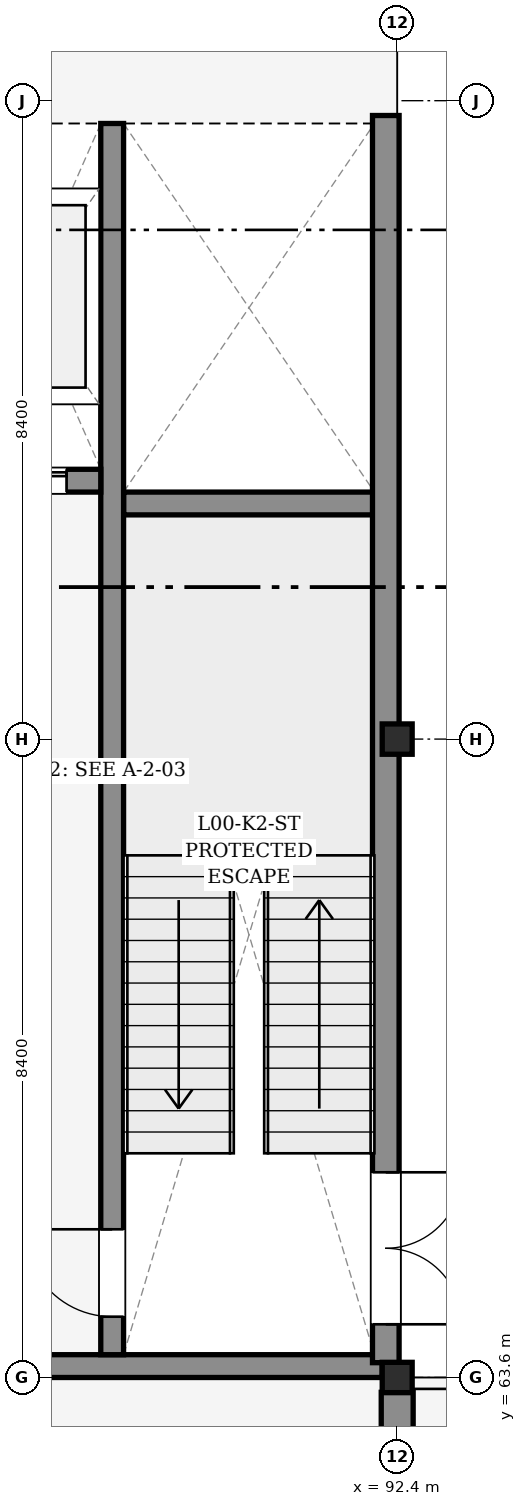
"""IFC4 building model, lengths in metres.
Left out: names, types, materials, properties, quantities, classifications, styles, units other than length and angle.
Written with IfcOpenShell. Run it as: python <this file> out.ifc"""

import sys

from ifc_helpers import new_model, si_unit, direction, frame, frame_2d, origin, origin_2d, place, context, subcontext, project, spatial, rectangle, i_section, extrude, element, fill, save


model = new_model("IFC4")
c1 = context("Model", 3, precision=1e-05, world=origin(), true_north=direction((0.0, 1.0)))
c2 = subcontext(c1, "Body", "Model", "MODEL_VIEW")
j1 = project(units=[si_unit("LENGTHUNIT", "METRE"), si_unit("PLANEANGLEUNIT", "RADIAN")], contexts=[c1])
p1 = place(None, origin())
s1 = spatial("IfcSite", under=j1, at=p1, CompositionType="ELEMENT")
p2 = place(p1, origin())
s2 = spatial("IfcBuilding", under=s1, at=p2, CompositionType="ELEMENT")
p3 = place(p2, origin())
s3 = spatial("IfcBuildingStorey", under=s2, at=p3, CompositionType="ELEMENT", Elevation=0.0)
for number, where, z_axis, x_axis in (
    (1, (92.4, 63.6, 0.0), (0.0, 0.0, 1.0), (1.0, 0.0, 0.0)),
    (2, (92.4, 72.0, 0.0), (0.0, 0.0, 1.0), (1.0, 0.0, 0.0)),
    (3, (92.4, 80.4, 0.0), (0.0, 0.0, 1.0), (1.0, 0.0, 0.0)),
):
    element("IfcColumn", number, at=place(p3, frame(where, z_axis=z_axis, x_axis=x_axis)), inside=s3, PredefinedType="COLUMN", context=c2, shape_type="SweptSolid", body=[
        extrude(i_section(OverallWidth=0.399, OverallDepth=0.394, WebThickness=0.023, FlangeThickness=0.037, FilletRadius=0.015, at=origin_2d()), origin(), (0.0, 0.0, 1.0), 5.4),
    ])
p4 = place(p3, frame((92.4, 55.395, 0.0), z_axis=(0.0, 0.0, 1.0), x_axis=(0.0, 1.0, 0.0)))
e4 = element("IfcWall", 4, at=p4, inside=s3, PredefinedType="STANDARD", context=c2, shape_type="SweptSolid", body=[
    extrude(rectangle(XDim=8.01, YDim=0.42, at=frame_2d((4.005, 0.0))), origin(), (0.0, 0.0, 1.0), 4.335),
])
p5 = place(p4, frame((2.9, 0.0, 0.0)))
e5 = element("IfcOpeningElement", 5, at=p5, cuts=e4, PredefinedType="OPENING", context=c2, shape_type="SweptSolid", body=[
    extrude(rectangle(XDim=2.2, YDim=2.6, at=frame_2d((1.1, 1.3))), frame((0.0, 0.22, 0.0), z_axis=(0.0, -1.0, 0.0), x_axis=(1.0, 0.0, 0.0)), (0.0, 0.0, 1.0), 0.44),
])
for number, where, z_axis, x_axis in (
    (6, (84.198, 63.75, 0.0), (0.0, 0.0, 1.0), (1.0, 0.0, 0.0)),
    (7, (84.198, 80.25, 0.0), (0.0, 0.0, 1.0), (1.0, 0.0, 0.0)),
):
    element("IfcWall", number, at=place(p3, frame(where, z_axis=z_axis, x_axis=x_axis)), inside=s3, PredefinedType="SHEAR", context=c2, shape_type="SweptSolid", body=[
        extrude(rectangle(XDim=8.005, YDim=0.3, at=frame_2d((4.002, 0.0))), origin(), (0.0, 0.0, 1.0), 5.18),
    ])
p6 = place(p3, frame((88.8, 75.1, 0.0), z_axis=(0.0, 0.0, 1.0), x_axis=(1.0, 0.0, 0.0)))
e8 = element("IfcWall", 8, at=p6, inside=s3, PredefinedType="SHEAR", context=c2, shape_type="SweptSolid", body=[
    extrude(rectangle(XDim=3.3, YDim=0.3, at=frame_2d((1.65, 0.0))), origin(), (0.0, 0.0, 1.0), 5.18),
])
p7 = place(p3, frame((92.25, 63.795, 0.0), z_axis=(0.0, 0.0, 1.0), x_axis=(0.0, 1.0, 0.0)))
e9 = element("IfcWall", 9, at=p7, inside=s3, PredefinedType="SHEAR", context=c2, shape_type="SweptSolid", body=[
    extrude(rectangle(XDim=16.41, YDim=0.35, at=frame_2d((8.205, 0.0))), origin(), (0.0, 0.0, 1.0), 5.18),
])
p8 = place(p7, frame((0.505, 0.0, 0.0)))
e10 = element("IfcOpeningElement", 10, at=p8, cuts=e9, PredefinedType="OPENING", context=c2, shape_type="SweptSolid", body=[
    extrude(rectangle(XDim=2.0, YDim=2.24, at=frame_2d((1.0, 1.12))), frame((0.0, 0.185, 0.0), z_axis=(0.0, -1.0, 0.0), x_axis=(1.0, 0.0, 0.0)), (0.0, 0.0, 1.0), 0.37),
])
p9 = place(p3, frame((88.65, 63.9, 0.0), z_axis=(0.0, 0.0, 1.0), x_axis=(0.0, 1.0, 0.0)))
e11 = element("IfcWall", 11, at=p9, inside=s3, PredefinedType="SHEAR", context=c2, shape_type="SweptSolid", body=[
    extrude(rectangle(XDim=16.2, YDim=0.3, at=frame_2d((8.1, 0.0))), origin(), (0.0, 0.0, 1.0), 5.18),
])
p10 = place(p9, frame((0.5, 0.0, 0.0)))
e12 = element("IfcOpeningElement", 12, at=p10, cuts=e11, PredefinedType="OPENING", context=c2, shape_type="SweptSolid", body=[
    extrude(rectangle(XDim=1.15, YDim=2.15, at=frame_2d((0.575, 1.075))), frame((0.0, 0.16, 0.0), z_axis=(0.0, -1.0, 0.0), x_axis=(1.0, 0.0, 0.0)), (0.0, 0.0, 1.0), 0.32),
])
p11 = place(p3, frame((84.3, 75.4, 0.0), z_axis=(0.0, 0.0, 1.0), x_axis=(1.0, 0.0, 0.0)))
e13 = element("IfcWall", 13, at=p11, inside=s3, PredefinedType="SHEAR", context=c2, shape_type="SweptSolid", body=[
    extrude(rectangle(XDim=4.2, YDim=0.3, at=frame_2d((2.1, 0.0))), origin(), (0.0, 0.0, 1.0), 5.18),
])
p12 = place(p11, frame((0.45, 0.0, 0.0)))
e14 = element("IfcOpeningElement", 14, at=p12, cuts=e13, PredefinedType="OPENING", context=c2, shape_type="SweptSolid", body=[
    extrude(rectangle(XDim=1.1, YDim=2.2, at=frame_2d((0.55, 1.1))), frame((0.0, 0.16, 0.0), z_axis=(0.0, -1.0, 0.0), x_axis=(1.0, 0.0, 0.0)), (0.0, 0.0, 1.0), 0.32),
])
p13 = place(p11, frame((2.65, 0.0, 0.0)))
e15 = element("IfcOpeningElement", 15, at=p13, cuts=e13, PredefinedType="OPENING", context=c2, shape_type="SweptSolid", body=[
    extrude(rectangle(XDim=1.1, YDim=2.2, at=frame_2d((0.55, 1.1))), frame((0.0, 0.16, 0.0), z_axis=(0.0, -1.0, 0.0), x_axis=(1.0, 0.0, 0.0)), (0.0, 0.0, 1.0), 0.32),
])
p14 = place(p8, frame((2.0, 0.0, 0.0), z_axis=(0.0, 0.0, 1.0), x_axis=(-1.0, 0.0, 0.0)))
e16 = element("IfcDoor", 16, at=p14, inside=s3, OperationType="DOUBLE_DOOR_SINGLE_SWING", PredefinedType="DOOR", context=c2, shape_type="SweptSolid", body=[
    extrude(rectangle(XDim=2.0, YDim=2.24, at=frame_2d((1.0, 1.12))), frame((0.0, 0.025, 0.0), z_axis=(0.0, -1.0, 0.0), x_axis=(1.0, 0.0, 0.0)), (0.0, 0.0, 1.0), 0.05),
])
fill(e10, e16)
p15 = place(p10, origin())
e17 = element("IfcDoor", 17, at=p15, inside=s3, OperationType="SINGLE_SWING_RIGHT", PredefinedType="DOOR", context=c2, shape_type="SweptSolid", body=[
    extrude(rectangle(XDim=1.15, YDim=2.15, at=frame_2d((0.575, 1.075))), frame((0.0, 0.025, 0.0), z_axis=(0.0, -1.0, 0.0), x_axis=(1.0, 0.0, 0.0)), (0.0, 0.0, 1.0), 0.05),
])
fill(e12, e17)
p16 = place(p13, origin())
e18 = element("IfcDoor", 18, at=p16, inside=s3, OperationType="SLIDING_TO_LEFT", PredefinedType="DOOR", context=c2, shape_type="SweptSolid", body=[
    extrude(rectangle(XDim=1.1, YDim=2.2, at=frame_2d((0.55, 1.1))), frame((0.0, 0.025, 0.0), z_axis=(0.0, -1.0, 0.0), x_axis=(1.0, 0.0, 0.0)), (0.0, 0.0, 1.0), 0.05),
])
fill(e15, e18)
save(model, sys.argv[1])
